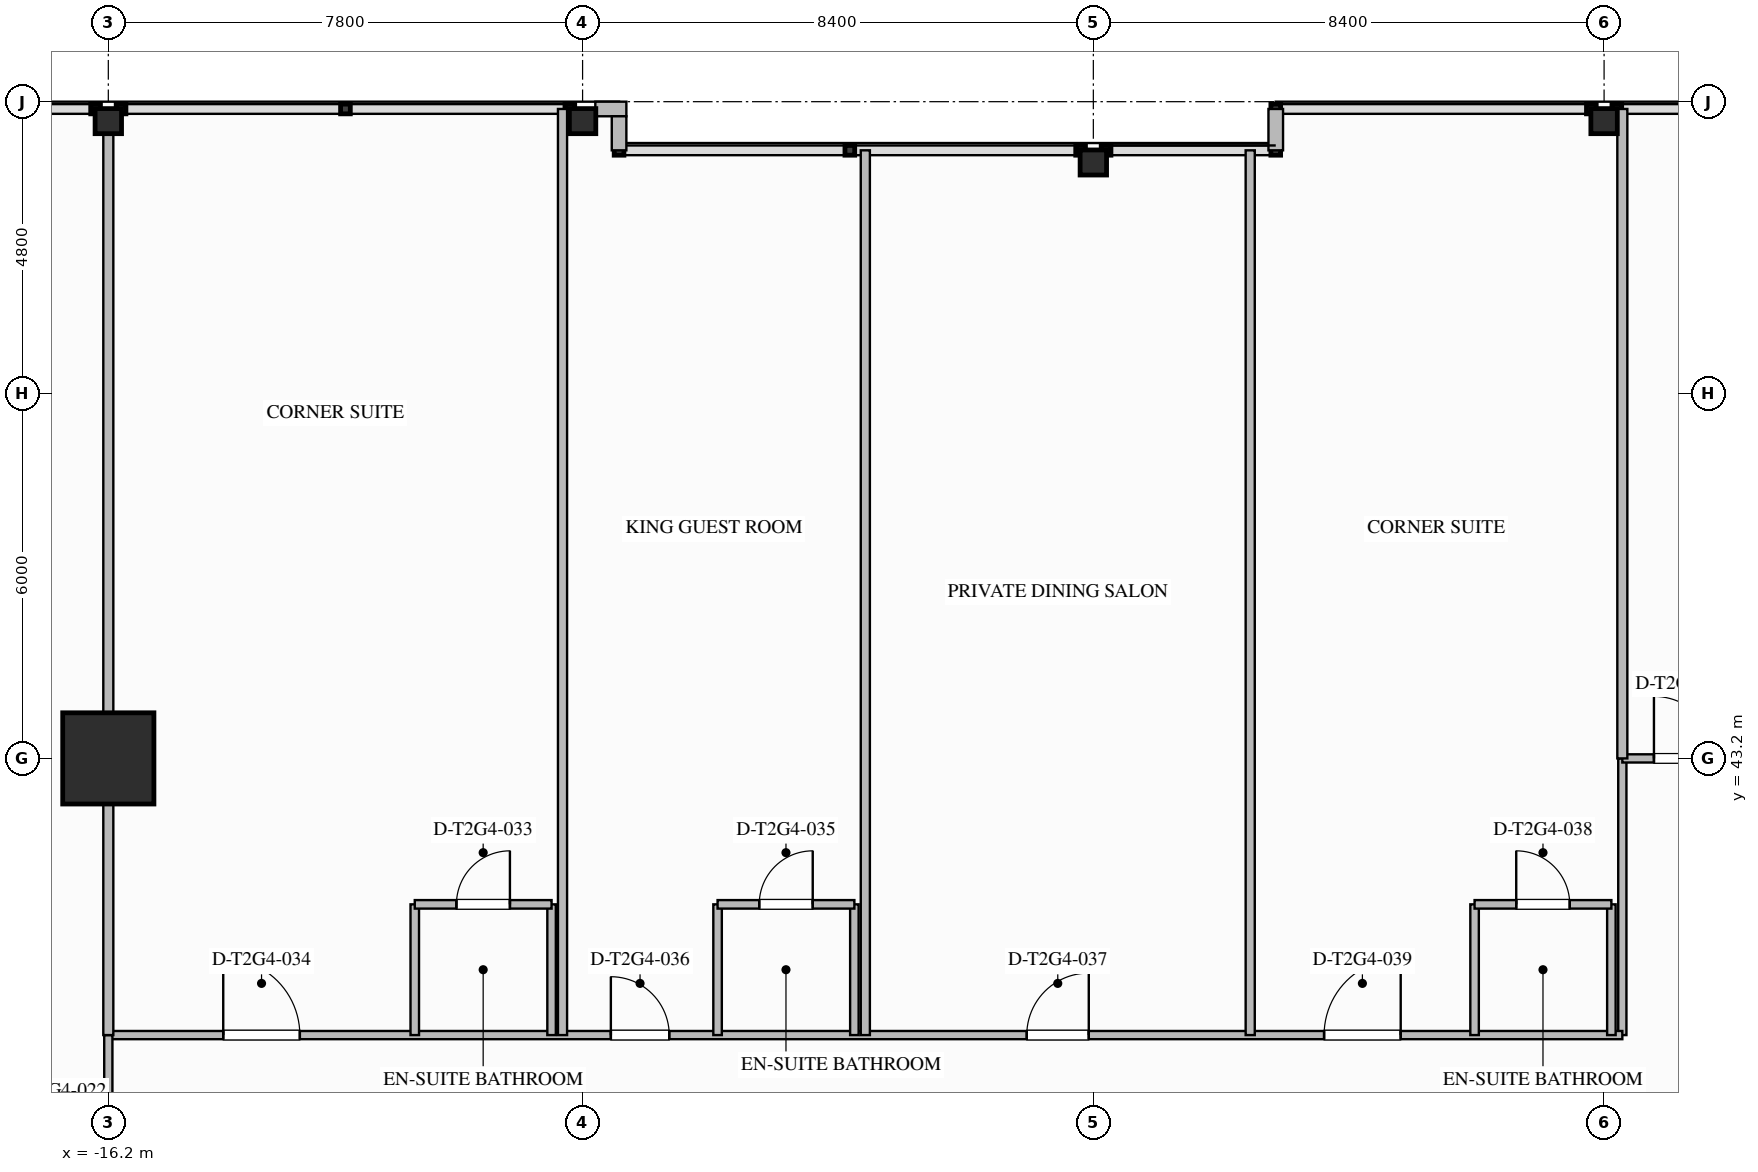
"""IFC4 building model, lengths in metres.
Left out: names, types, materials, properties, quantities, classifications, styles, units other than length and angle.
Written with IfcOpenShell. Run it as: python <this file> out.ifc"""

import sys

from ifc_helpers import new_model, si_unit, direction, frame, frame_2d, origin, origin_2d, place, context, subcontext, project, spatial, rectangle, i_section, extrude, element, fill, save


model = new_model("IFC4")
c1 = context("Model", 3, precision=1e-05, world=origin(), true_north=direction((0.0, 1.0)))
c2 = subcontext(c1, "Body", "Model", "MODEL_VIEW")
j1 = project(units=[si_unit("LENGTHUNIT", "METRE"), si_unit("PLANEANGLEUNIT", "RADIAN")], contexts=[c1])
p1 = place(None, origin())
s1 = spatial("IfcSite", under=j1, at=p1, CompositionType="ELEMENT")
p2 = place(p1, origin())
s2 = spatial("IfcBuilding", under=s1, at=p2, CompositionType="ELEMENT")
p3 = place(p2, frame((0.0, 0.0, 123.3)))
s3 = spatial("IfcBuildingStorey", under=s2, at=p3, CompositionType="ELEMENT", Elevation=123.3)
p4 = place(p3, frame((-16.2, 43.2, 0.0), z_axis=(0.0, 0.0, 1.0), x_axis=(1.0, 0.0, 0.0)))
e1 = element("IfcColumn", 1, at=p4, inside=s3, PredefinedType="COLUMN", context=c2, shape_type="SweptSolid", body=[
    extrude(rectangle(XDim=1.5, YDim=1.5, at=origin_2d()), origin(), (0.0, 0.0, 1.0), 3.5),
])
for number, where, z_axis, x_axis in (
    (2, (-16.2, 53.68, 0.0), (0.0, 0.0, 1.0), (0.0, 1.0, 0.0)),
    (3, (-8.4, 53.68, 0.0), (0.0, 0.0, 1.0), (0.0, 1.0, 0.0)),
    (4, (0.0, 53.0, 0.0), (0.0, 0.0, 1.0), (0.0, 1.0, 0.0)),
    (5, (8.4, 53.68, 0.0), (0.0, 0.0, 1.0), (0.0, 1.0, 0.0)),
):
    element("IfcColumn", number, at=place(p3, frame(where, z_axis=z_axis, x_axis=x_axis)), inside=s3, PredefinedType="COLUMN", context=c2, shape_type="SweptSolid", body=[
        extrude(i_section(OverallWidth=0.412, OverallDepth=0.435, WebThickness=0.036, FlangeThickness=0.057, FilletRadius=0.028, at=origin_2d()), origin(), (0.0, 0.0, 1.0), 3.497),
    ])
p5 = place(p3, frame((-8.191, 53.88, 0.0), z_axis=(0.0, 0.0, 1.0), x_axis=(1.0, 0.0, 0.0)))
e6 = element("IfcWall", 6, at=p5, inside=s3, PredefinedType="STANDARD", context=c2, shape_type="SweptSolid", body=[
    extrude(rectangle(XDim=0.511, YDim=0.24, at=frame_2d((0.255, 0.0))), origin(), (0.0, 0.0, 1.0), 3.24),
])
p6 = place(p3, frame((-7.8, 53.76, 0.0), z_axis=(0.0, 0.0, 1.0), x_axis=(0.0, -1.0, 0.0)))
e7 = element("IfcWall", 7, at=p6, inside=s3, PredefinedType="STANDARD", context=c2, shape_type="SweptSolid", body=[
    extrude(rectangle(XDim=0.56, YDim=0.24, at=frame_2d((0.28, 0.0))), origin(), (0.0, 0.0, 1.0), 3.24),
])
p7 = place(p3, frame((3.0, 53.2, 0.0), z_axis=(0.0, 0.0, 1.0), x_axis=(0.0, 1.0, 0.0)))
e8 = element("IfcWall", 8, at=p7, inside=s3, PredefinedType="STANDARD", context=c2, shape_type="SweptSolid", body=[
    extrude(rectangle(XDim=0.68, YDim=0.24, at=frame_2d((0.34, 0.0))), origin(), (0.0, 0.0, 1.0), 3.24),
])
p8 = place(p3, frame((8.7, 38.65, 0.0), z_axis=(0.0, 0.0, 1.0), x_axis=(0.0, 1.0, 0.0)))
e9 = element("IfcWall", 9, at=p8, inside=s3, PredefinedType="PARTITIONING", context=c2, shape_type="SweptSolid", body=[
    extrude(rectangle(XDim=4.55, YDim=0.135, at=frame_2d((2.275, 0.0))), origin(), (0.0, 0.0, 1.0), 3.24),
])
p9 = place(p3, frame((-16.2, 38.65, 0.0), z_axis=(0.0, 0.0, 1.0), x_axis=(1.0, 0.0, 0.0)))
e10 = element("IfcWall", 10, at=p9, inside=s3, PredefinedType="PARTITIONING", context=c2, shape_type="SweptSolid", body=[
    extrude(rectangle(XDim=24.9, YDim=0.135, at=frame_2d((12.45, 0.0))), origin(), (0.0, 0.0, 1.0), 3.24),
])
p10 = place(p9, frame((1.89, 0.0, 0.0)))
e11 = element("IfcOpeningElement", 11, at=p10, cuts=e10, PredefinedType="OPENING", context=c2, shape_type="SweptSolid", body=[
    extrude(rectangle(XDim=1.26, YDim=2.2, at=frame_2d((0.63, 1.1))), frame((0.0, 0.077, 0.0), z_axis=(0.0, -1.0, 0.0), x_axis=(1.0, 0.0, 0.0)), (0.0, 0.0, 1.0), 0.155),
])
p11 = place(p9, frame((8.265, 0.0, 0.0)))
e12 = element("IfcOpeningElement", 12, at=p11, cuts=e10, PredefinedType="OPENING", context=c2, shape_type="SweptSolid", body=[
    extrude(rectangle(XDim=0.96, YDim=2.15, at=frame_2d((0.48, 1.075))), frame((0.0, 0.077, 0.0), z_axis=(0.0, -1.0, 0.0), x_axis=(1.0, 0.0, 0.0)), (0.0, 0.0, 1.0), 0.155),
])
p12 = place(p9, frame((15.105, 0.0, 0.0)))
e13 = element("IfcOpeningElement", 13, at=p12, cuts=e10, PredefinedType="OPENING", context=c2, shape_type="SweptSolid", body=[
    extrude(rectangle(XDim=1.02, YDim=2.15, at=frame_2d((0.51, 1.075))), frame((0.0, 0.077, 0.0), z_axis=(0.0, -1.0, 0.0), x_axis=(1.0, 0.0, 0.0)), (0.0, 0.0, 1.0), 0.155),
])
p13 = place(p9, frame((19.995, 0.0, 0.0)))
e14 = element("IfcOpeningElement", 14, at=p13, cuts=e10, PredefinedType="OPENING", context=c2, shape_type="SweptSolid", body=[
    extrude(rectangle(XDim=1.26, YDim=2.2, at=frame_2d((0.63, 1.1))), frame((0.0, 0.077, 0.0), z_axis=(0.0, -1.0, 0.0), x_axis=(1.0, 0.0, 0.0)), (0.0, 0.0, 1.0), 0.155),
])
p14 = place(p3, frame((-16.2, 35.7, 0.0), z_axis=(0.0, 0.0, 1.0), x_axis=(0.0, 1.0, 0.0)))
e15 = element("IfcWall", 15, at=p14, inside=s3, PredefinedType="PARTITIONING", context=c2, shape_type="SweptSolid", body=[
    extrude(rectangle(XDim=2.95, YDim=0.135, at=frame_2d((1.475, 0.0))), origin(), (0.0, 0.0, 1.0), 2.53),
])
p15 = place(p14, frame((0.52, 0.0, 0.0)))
e16 = element("IfcOpeningElement", 16, at=p15, cuts=e15, PredefinedType="OPENING", context=c2, shape_type="SweptSolid", body=[
    extrude(rectangle(XDim=1.02, YDim=2.15, at=frame_2d((0.51, 1.075))), frame((0.0, 0.077, 0.0), z_axis=(0.0, -1.0, 0.0), x_axis=(1.0, 0.0, 0.0)), (0.0, 0.0, 1.0), 0.155),
])
p16 = place(p3, frame((8.7, 43.2, 0.0), z_axis=(0.0, 0.0, 1.0), x_axis=(1.0, 0.0, 0.0)))
e17 = element("IfcWall", 17, at=p16, inside=s3, PredefinedType="PARTITIONING", context=c2, shape_type="SweptSolid", body=[
    extrude(rectangle(XDim=2.75, YDim=0.135, at=frame_2d((1.375, 0.0))), origin(), (0.0, 0.0, 1.0), 2.53),
])
p17 = place(p16, frame((0.52, 0.0, 0.0)))
e18 = element("IfcOpeningElement", 18, at=p17, cuts=e17, PredefinedType="OPENING", context=c2, shape_type="SweptSolid", body=[
    extrude(rectangle(XDim=1.02, YDim=2.15, at=frame_2d((0.51, 1.075))), frame((0.0, 0.077, 0.0), z_axis=(0.0, -1.0, 0.0), x_axis=(1.0, 0.0, 0.0)), (0.0, 0.0, 1.0), 0.155),
])
p18 = place(p3, frame((-16.2, 38.65, 0.0), z_axis=(0.0, 0.0, 1.0), x_axis=(0.0, 1.0, 0.0)))
e19 = element("IfcWall", 19, at=p18, inside=s3, PredefinedType="PARTITIONING", context=c2, shape_type="SweptSolid", body=[
    extrude(rectangle(XDim=15.23, YDim=0.165, at=frame_2d((7.615, 0.0))), origin(), (0.0, 0.0, 1.0), 2.53),
])
p19 = place(p3, frame((8.7, 43.2, 0.0), z_axis=(0.0, 0.0, 1.0), x_axis=(0.0, 1.0, 0.0)))
e20 = element("IfcWall", 20, at=p19, inside=s3, PredefinedType="PARTITIONING", context=c2, shape_type="SweptSolid", body=[
    extrude(rectangle(XDim=10.68, YDim=0.165, at=frame_2d((5.34, 0.0))), origin(), (0.0, 0.0, 1.0), 2.53),
])
for number, where, z_axis, x_axis in (
    (21, (-11.16, 38.65, 0.0), (0.0, 0.0, 1.0), (0.0, 1.0, 0.0)),
    (22, (-8.91, 38.65, 0.0), (0.0, 0.0, 1.0), (0.0, 1.0, 0.0)),
):
    element("IfcWall", number, at=place(p3, frame(where, z_axis=z_axis, x_axis=x_axis)), inside=s3, PredefinedType="PLUMBINGWALL", context=c2, shape_type="SweptSolid", body=[
        extrude(rectangle(XDim=2.15, YDim=0.14, at=frame_2d((1.075, 0.0))), origin(), (0.0, 0.0, 1.0), 3.24),
    ])
p20 = place(p3, frame((-11.16, 40.8, 0.0), z_axis=(0.0, 0.0, 1.0), x_axis=(1.0, 0.0, 0.0)))
e23 = element("IfcWall", 23, at=p20, inside=s3, PredefinedType="PLUMBINGWALL", context=c2, shape_type="SweptSolid", body=[
    extrude(rectangle(XDim=2.25, YDim=0.14, at=frame_2d((1.125, 0.0))), origin(), (0.0, 0.0, 1.0), 3.24),
])
p21 = place(p20, frame((0.685, 0.0, 0.0)))
e24 = element("IfcOpeningElement", 24, at=p21, cuts=e23, PredefinedType="OPENING", context=c2, shape_type="SweptSolid", body=[
    extrude(rectangle(XDim=0.88, YDim=2.1, at=frame_2d((0.44, 1.05))), frame((0.0, 0.08, 0.0), z_axis=(0.0, -1.0, 0.0), x_axis=(1.0, 0.0, 0.0)), (0.0, 0.0, 1.0), 0.16),
])
p22 = place(p3, frame((-8.73, 38.65, 0.0), z_axis=(0.0, 0.0, 1.0), x_axis=(0.0, 1.0, 0.0)))
e25 = element("IfcWall", 25, at=p22, inside=s3, PredefinedType="PARTITIONING", context=c2, shape_type="SweptSolid", body=[
    extrude(rectangle(XDim=15.23, YDim=0.15, at=frame_2d((7.615, 0.0))), origin(), (0.0, 0.0, 1.0), 2.53),
])
for number, where, z_axis, x_axis in (
    (26, (-6.18, 38.65, 0.0), (0.0, 0.0, 1.0), (0.0, 1.0, 0.0)),
    (27, (-3.93, 38.65, 0.0), (0.0, 0.0, 1.0), (0.0, 1.0, 0.0)),
):
    element("IfcWall", number, at=place(p3, frame(where, z_axis=z_axis, x_axis=x_axis)), inside=s3, PredefinedType="PLUMBINGWALL", context=c2, shape_type="SweptSolid", body=[
        extrude(rectangle(XDim=2.15, YDim=0.14, at=frame_2d((1.075, 0.0))), origin(), (0.0, 0.0, 1.0), 3.24),
    ])
p23 = place(p3, frame((-6.18, 40.8, 0.0), z_axis=(0.0, 0.0, 1.0), x_axis=(1.0, 0.0, 0.0)))
e28 = element("IfcWall", 28, at=p23, inside=s3, PredefinedType="PLUMBINGWALL", context=c2, shape_type="SweptSolid", body=[
    extrude(rectangle(XDim=2.25, YDim=0.14, at=frame_2d((1.125, 0.0))), origin(), (0.0, 0.0, 1.0), 3.24),
])
p24 = place(p23, frame((0.685, 0.0, 0.0)))
e29 = element("IfcOpeningElement", 29, at=p24, cuts=e28, PredefinedType="OPENING", context=c2, shape_type="SweptSolid", body=[
    extrude(rectangle(XDim=0.88, YDim=2.1, at=frame_2d((0.44, 1.05))), frame((0.0, 0.08, 0.0), z_axis=(0.0, -1.0, 0.0), x_axis=(1.0, 0.0, 0.0)), (0.0, 0.0, 1.0), 0.16),
])
for number, where, z_axis, x_axis in (
    (30, (-3.75, 38.65, 0.0), (0.0, 0.0, 1.0), (0.0, 1.0, 0.0)),
    (31, (2.58, 38.65, 0.0), (0.0, 0.0, 1.0), (0.0, 1.0, 0.0)),
):
    element("IfcWall", number, at=place(p3, frame(where, z_axis=z_axis, x_axis=x_axis)), inside=s3, PredefinedType="PARTITIONING", context=c2, shape_type="SweptSolid", body=[
        extrude(rectangle(XDim=14.55, YDim=0.15, at=frame_2d((7.275, 0.0))), origin(), (0.0, 0.0, 1.0), 3.24),
    ])
p25 = place(p3, frame((6.27, 38.65, 0.0), z_axis=(0.0, 0.0, 1.0), x_axis=(0.0, 1.0, 0.0)))
e32 = element("IfcWall", 32, at=p25, inside=s3, PredefinedType="PLUMBINGWALL", context=c2, shape_type="SweptSolid", body=[
    extrude(rectangle(XDim=2.15, YDim=0.14, at=frame_2d((1.075, 0.0))), origin(), (0.0, 0.0, 1.0), 3.24),
])
p26 = place(p3, frame((8.52, 38.65, 0.0), z_axis=(0.0, 0.0, 1.0), x_axis=(0.0, 1.0, 0.0)))
e33 = element("IfcWall", 33, at=p26, inside=s3, PredefinedType="PLUMBINGWALL", context=c2, shape_type="SweptSolid", body=[
    extrude(rectangle(XDim=2.15, YDim=0.14, at=frame_2d((1.075, 0.0))), origin(), (0.0, 0.0, 1.0), 2.617),
])
p27 = place(p3, frame((6.27, 40.8, 0.0), z_axis=(0.0, 0.0, 1.0), x_axis=(1.0, 0.0, 0.0)))
e34 = element("IfcWall", 34, at=p27, inside=s3, PredefinedType="PLUMBINGWALL", context=c2, shape_type="SweptSolid", body=[
    extrude(rectangle(XDim=2.25, YDim=0.14, at=frame_2d((1.125, 0.0))), origin(), (0.0, 0.0, 1.0), 3.24),
])
p28 = place(p27, frame((0.685, 0.0, 0.0)))
e35 = element("IfcOpeningElement", 35, at=p28, cuts=e34, PredefinedType="OPENING", context=c2, shape_type="SweptSolid", body=[
    extrude(rectangle(XDim=0.88, YDim=2.1, at=frame_2d((0.44, 1.05))), frame((0.0, 0.08, 0.0), z_axis=(0.0, -1.0, 0.0), x_axis=(1.0, 0.0, 0.0)), (0.0, 0.0, 1.0), 0.16),
])
p29 = place(p17, origin())
e36 = element("IfcDoor", 36, at=p29, inside=s3, OperationType="SINGLE_SWING_LEFT", PredefinedType="DOOR", context=c2, shape_type="SweptSolid", body=[
    extrude(rectangle(XDim=1.02, YDim=2.15, at=frame_2d((0.51, 1.075))), frame((0.0, 0.025, 0.0), z_axis=(0.0, -1.0, 0.0), x_axis=(1.0, 0.0, 0.0)), (0.0, 0.0, 1.0), 0.05),
])
fill(e18, e36)
p30 = place(p21, origin())
e37 = element("IfcDoor", 37, at=p30, inside=s3, OperationType="SINGLE_SWING_RIGHT", PredefinedType="DOOR", context=c2, shape_type="SweptSolid", body=[
    extrude(rectangle(XDim=0.88, YDim=2.1, at=frame_2d((0.44, 1.05))), frame((0.0, 0.025, 0.0), z_axis=(0.0, -1.0, 0.0), x_axis=(1.0, 0.0, 0.0)), (0.0, 0.0, 1.0), 0.05),
])
fill(e24, e37)
p31 = place(p10, origin())
e38 = element("IfcDoor", 38, at=p31, inside=s3, OperationType="SINGLE_SWING_LEFT", PredefinedType="DOOR", context=c2, shape_type="SweptSolid", body=[
    extrude(rectangle(XDim=1.26, YDim=2.2, at=frame_2d((0.63, 1.1))), frame((0.0, 0.025, 0.0), z_axis=(0.0, -1.0, 0.0), x_axis=(1.0, 0.0, 0.0)), (0.0, 0.0, 1.0), 0.05),
])
fill(e11, e38)
p32 = place(p24, origin())
e39 = element("IfcDoor", 39, at=p32, inside=s3, OperationType="SINGLE_SWING_RIGHT", PredefinedType="DOOR", context=c2, shape_type="SweptSolid", body=[
    extrude(rectangle(XDim=0.88, YDim=2.1, at=frame_2d((0.44, 1.05))), frame((0.0, 0.025, 0.0), z_axis=(0.0, -1.0, 0.0), x_axis=(1.0, 0.0, 0.0)), (0.0, 0.0, 1.0), 0.05),
])
fill(e29, e39)
p33 = place(p11, origin())
e40 = element("IfcDoor", 40, at=p33, inside=s3, OperationType="SINGLE_SWING_LEFT", PredefinedType="DOOR", context=c2, shape_type="SweptSolid", body=[
    extrude(rectangle(XDim=0.96, YDim=2.15, at=frame_2d((0.48, 1.075))), frame((0.0, 0.025, 0.0), z_axis=(0.0, -1.0, 0.0), x_axis=(1.0, 0.0, 0.0)), (0.0, 0.0, 1.0), 0.05),
])
fill(e12, e40)
p34 = place(p12, origin())
e41 = element("IfcDoor", 41, at=p34, inside=s3, OperationType="SINGLE_SWING_RIGHT", PredefinedType="DOOR", context=c2, shape_type="SweptSolid", body=[
    extrude(rectangle(XDim=1.02, YDim=2.15, at=frame_2d((0.51, 1.075))), frame((0.0, 0.025, 0.0), z_axis=(0.0, -1.0, 0.0), x_axis=(1.0, 0.0, 0.0)), (0.0, 0.0, 1.0), 0.05),
])
fill(e13, e41)
p35 = place(p28, origin())
e42 = element("IfcDoor", 42, at=p35, inside=s3, OperationType="SINGLE_SWING_LEFT", PredefinedType="DOOR", context=c2, shape_type="SweptSolid", body=[
    extrude(rectangle(XDim=0.88, YDim=2.1, at=frame_2d((0.44, 1.05))), frame((0.0, 0.025, 0.0), z_axis=(0.0, -1.0, 0.0), x_axis=(1.0, 0.0, 0.0)), (0.0, 0.0, 1.0), 0.05),
])
fill(e35, e42)
p36 = place(p13, origin())
e43 = element("IfcDoor", 43, at=p36, inside=s3, OperationType="SINGLE_SWING_RIGHT", PredefinedType="DOOR", context=c2, shape_type="SweptSolid", body=[
    extrude(rectangle(XDim=1.26, YDim=2.2, at=frame_2d((0.63, 1.1))), frame((0.0, 0.025, 0.0), z_axis=(0.0, -1.0, 0.0), x_axis=(1.0, 0.0, 0.0)), (0.0, 0.0, 1.0), 0.05),
])
fill(e14, e43)
save(model, sys.argv[1])
